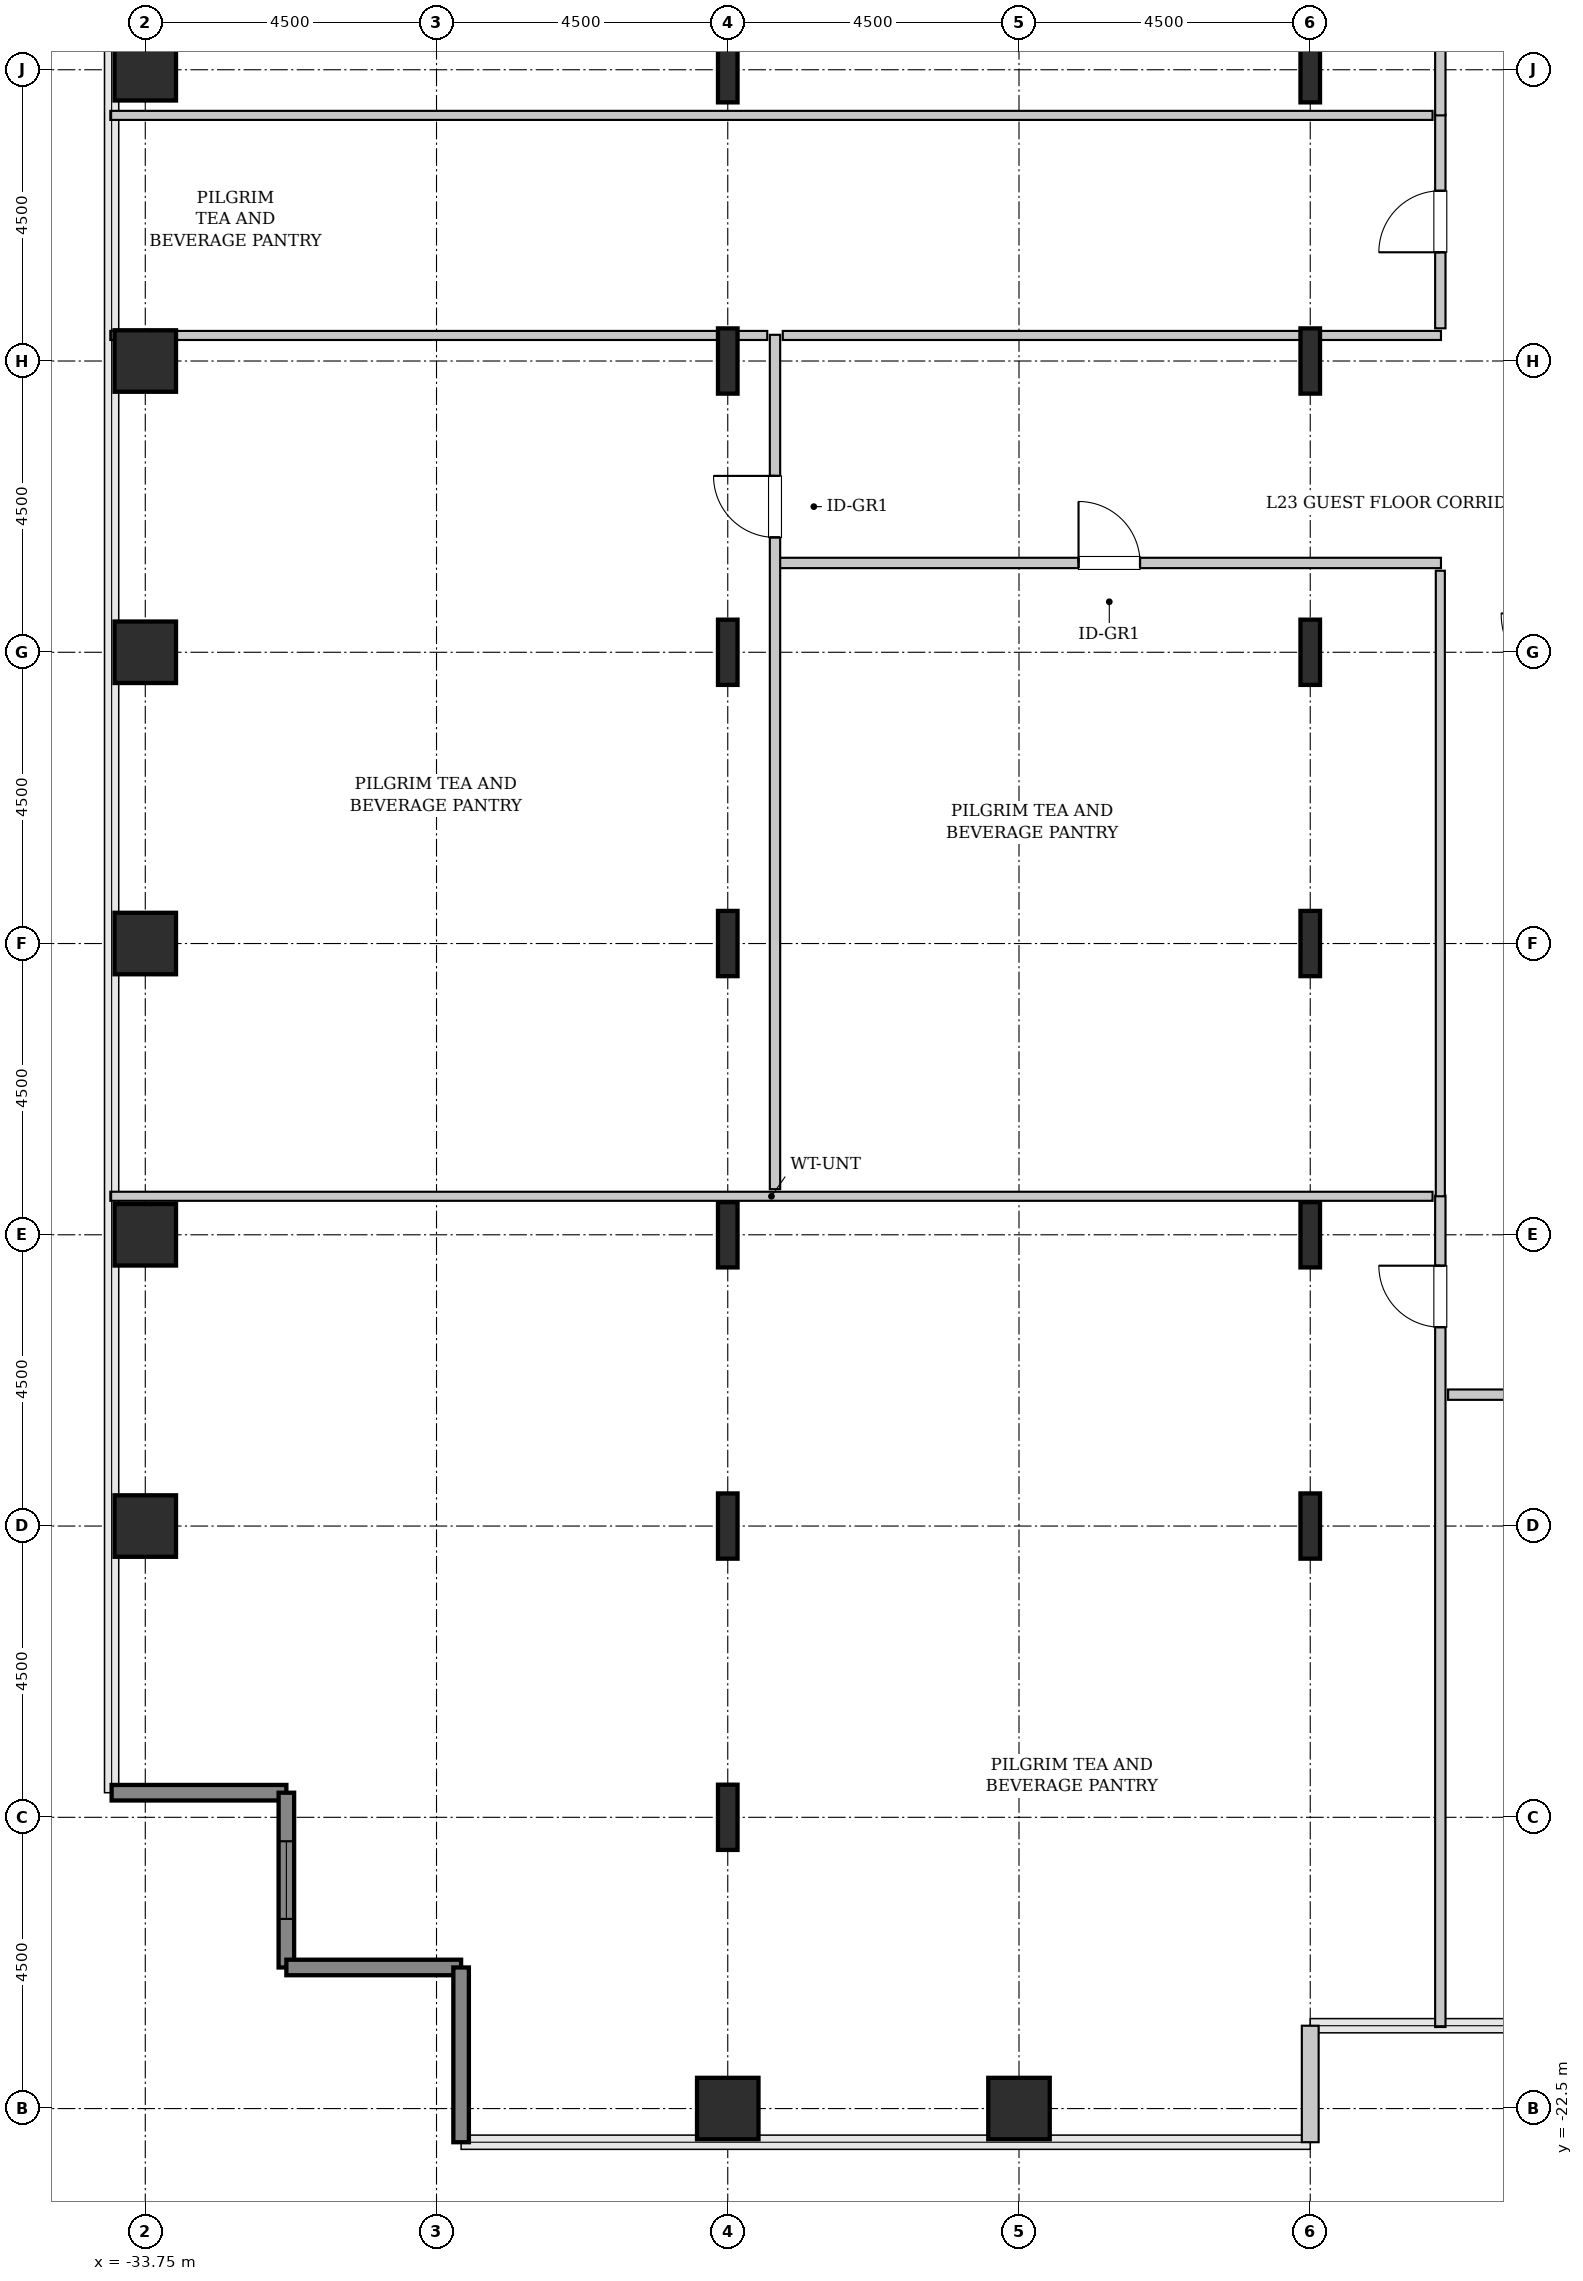
"""IFC4 building model, lengths in metres.
Left out: names, types, materials, properties, quantities, classifications, styles, units other than length and angle.
Written with IfcOpenShell. Run it as: python <this file> out.ifc"""

import sys

from ifc_helpers import new_model, si_unit, direction, frame, frame_2d, origin, origin_2d, place, context, subcontext, project, spatial, rectangle, hollow_rectangle, i_section, extrude, source, transform, mapped, element, fill, save


model = new_model("IFC4")
c1 = context("Model", 3, precision=1e-05, world=origin(), true_north=direction((0.0, 1.0)))
c2 = subcontext(c1, "Body", "Model", "MODEL_VIEW")
j1 = project(units=[si_unit("LENGTHUNIT", "METRE"), si_unit("PLANEANGLEUNIT", "RADIAN")], contexts=[c1])
p1 = place(None, origin())
s1 = spatial("IfcSite", under=j1, at=p1, CompositionType="ELEMENT")
p2 = place(p1, origin())
s2 = spatial("IfcBuilding", under=s1, at=p2, CompositionType="ELEMENT")
p3 = place(p2, frame((0.0, 0.0, 98.4)))
s3 = spatial("IfcBuildingStorey", under=s2, at=p3, CompositionType="ELEMENT", Elevation=98.4)
m1 = source(origin(), c2, "Body", "SweptSolid", [
    extrude(hollow_rectangle(XDim=0.95, YDim=0.95, WallThickness=0.045, InnerFilletRadius=0.045, OuterFilletRadius=0.09, at=origin_2d()), origin(), (0.0, 0.0, 1.0), 3.8),
])
for number, where, z_axis, x_axis in (
    (1, (-33.75, -13.5, 0.0), (0.0, 0.0, 1.0), (1.0, 0.0, 0.0)),
    (2, (-33.75, -9.0, 0.0), (0.0, 0.0, 1.0), (1.0, 0.0, 0.0)),
    (3, (-33.75, -4.5, 0.0), (0.0, 0.0, 1.0), (1.0, 0.0, 0.0)),
    (4, (-33.75, 0.0, 0.0), (0.0, 0.0, 1.0), (1.0, 0.0, 0.0)),
    (5, (-33.75, 4.5, 0.0), (0.0, 0.0, 1.0), (1.0, 0.0, 0.0)),
    (6, (-33.75, 9.0, 0.0), (0.0, 0.0, 1.0), (1.0, 0.0, 0.0)),
    (7, (-24.75, -22.5, 0.0), (0.0, 0.0, 1.0), (1.0, 0.0, 0.0)),
):
    element("IfcColumn", number, at=place(p3, frame(where, z_axis=z_axis, x_axis=x_axis)), inside=s3, PredefinedType="COLUMN", context=c2, shape_type="MappedRepresentation", body=[
        mapped(m1, transform((0.0, 0.0, 0.0), x_axis=(1.0, 0.0, 0.0), y_axis=(0.0, 1.0, 0.0), z_axis=(0.0, 0.0, 1.0), scale=1.0)),
    ])
m2 = source(origin(), c2, "Body", "SweptSolid", [
    extrude(i_section(OverallWidth=0.302, OverallDepth=1.008, WebThickness=0.021, FlangeThickness=0.04, FilletRadius=0.03, at=origin_2d()), origin(), (0.0, 0.0, 1.0), 3.8),
])
for number, where, z_axis, x_axis in (
    (8, (-24.75, -18.0, 0.0), (0.0, 0.0, 1.0), (1.0, 0.0, 0.0)),
    (9, (-24.75, -13.5, 0.0), (0.0, 0.0, 1.0), (1.0, 0.0, 0.0)),
    (10, (-24.75, -9.0, 0.0), (0.0, 0.0, 1.0), (1.0, 0.0, 0.0)),
    (11, (-24.75, -4.5, 0.0), (0.0, 0.0, 1.0), (1.0, 0.0, 0.0)),
    (12, (-24.75, 0.0, 0.0), (0.0, 0.0, 1.0), (1.0, 0.0, 0.0)),
    (13, (-24.75, 4.5, 0.0), (0.0, 0.0, 1.0), (1.0, 0.0, 0.0)),
    (14, (-24.75, 9.0, 0.0), (0.0, 0.0, 1.0), (1.0, 0.0, 0.0)),
):
    element("IfcColumn", number, at=place(p3, frame(where, z_axis=z_axis, x_axis=x_axis)), inside=s3, PredefinedType="COLUMN", context=c2, shape_type="MappedRepresentation", body=[
        mapped(m2, transform((0.0, 0.0, 0.0), x_axis=(1.0, 0.0, 0.0), y_axis=(0.0, 1.0, 0.0), z_axis=(0.0, 0.0, 1.0), scale=1.0)),
    ])
p4 = place(p3, frame((-20.25, -22.5, 0.0), z_axis=(0.0, 0.0, 1.0), x_axis=(1.0, 0.0, 0.0)))
e15 = element("IfcColumn", 15, at=p4, inside=s3, PredefinedType="COLUMN", context=c2, shape_type="MappedRepresentation", body=[
    mapped(m1, transform((0.0, 0.0, 0.0), x_axis=(1.0, 0.0, 0.0), y_axis=(0.0, 1.0, 0.0), z_axis=(0.0, 0.0, 1.0), scale=1.0)),
])
for number, where, z_axis, x_axis in (
    (16, (-15.75, -13.5, 0.0), (0.0, 0.0, 1.0), (1.0, 0.0, 0.0)),
    (17, (-15.75, -9.0, 0.0), (0.0, 0.0, 1.0), (1.0, 0.0, 0.0)),
    (18, (-15.75, -4.5, 0.0), (0.0, 0.0, 1.0), (1.0, 0.0, 0.0)),
    (19, (-15.75, 0.0, 0.0), (0.0, 0.0, 1.0), (1.0, 0.0, 0.0)),
    (20, (-15.75, 4.5, 0.0), (0.0, 0.0, 1.0), (1.0, 0.0, 0.0)),
    (21, (-15.75, 9.0, 0.0), (0.0, 0.0, 1.0), (1.0, 0.0, 0.0)),
):
    element("IfcColumn", number, at=place(p3, frame(where, z_axis=z_axis, x_axis=x_axis)), inside=s3, PredefinedType="COLUMN", context=c2, shape_type="MappedRepresentation", body=[
        mapped(m2, transform((0.0, 0.0, 0.0), x_axis=(1.0, 0.0, 0.0), y_axis=(0.0, 1.0, 0.0), z_axis=(0.0, 0.0, 1.0), scale=1.0)),
    ])
m3 = source(origin(), c2, "Body", "SweptSolid", [
    extrude(rectangle(XDim=2.7, YDim=0.24, at=frame_2d((1.35, 0.0))), origin(), (0.0, 0.0, 1.0), 3.55),
])
p5 = place(p3, frame((-34.27, -17.62, 0.0), z_axis=(0.0, 0.0, 1.0), x_axis=(1.0, 0.0, 0.0)))
e22 = element("IfcWall", 22, at=p5, inside=s3, PredefinedType="SHEAR", context=c2, shape_type="MappedRepresentation", body=[
    mapped(m3, transform((0.0, 0.0, 0.0), x_axis=(1.0, 0.0, 0.0), y_axis=(0.0, 1.0, 0.0), z_axis=(0.0, 0.0, 1.0), scale=1.0)),
])
p6 = place(p3, frame((-31.57, -17.62, 0.0), z_axis=(0.0, 0.0, 1.0), x_axis=(0.0, -1.0, 0.0)))
e23 = element("IfcWall", 23, at=p6, inside=s3, PredefinedType="SHEAR", context=c2, shape_type="MappedRepresentation", body=[
    mapped(m3, transform((0.0, 0.0, 0.0), x_axis=(1.0, 0.0, 0.0), y_axis=(0.0, 1.0, 0.0), z_axis=(0.0, 0.0, 1.0), scale=1.0)),
])
p7 = place(p6, frame((0.75, 0.0, 0.85)))
e24 = element("IfcOpeningElement", 24, at=p7, cuts=e23, PredefinedType="OPENING", context=c2, shape_type="SweptSolid", body=[
    extrude(rectangle(XDim=1.2, YDim=1.8, at=frame_2d((0.6, 0.9))), frame((0.0, 0.13, 0.0), z_axis=(0.0, -1.0, 0.0), x_axis=(1.0, 0.0, 0.0)), (0.0, 0.0, 1.0), 0.26),
])
for number, where, z_axis, x_axis in (
    (25, (-31.57, -20.32, 0.0), (0.0, 0.0, 1.0), (1.0, 0.0, 0.0)),
    (26, (-28.87, -20.32, 0.0), (0.0, 0.0, 1.0), (0.0, -1.0, 0.0)),
):
    element("IfcWall", number, at=place(p3, frame(where, z_axis=z_axis, x_axis=x_axis)), inside=s3, PredefinedType="SHEAR", context=c2, shape_type="MappedRepresentation", body=[
        mapped(m3, transform((0.0, 0.0, 0.0), x_axis=(1.0, 0.0, 0.0), y_axis=(0.0, 1.0, 0.0), z_axis=(0.0, 0.0, 1.0), scale=1.0)),
    ])
m4 = source(origin(), c2, "Body", "SweptSolid", [
    extrude(rectangle(XDim=1.8, YDim=0.26, at=frame_2d((0.9, 0.0))), origin(), (0.0, 0.0, 1.0), 3.55),
])
p8 = place(p3, frame((-15.75, -23.02, 0.0), z_axis=(0.0, 0.0, 1.0), x_axis=(0.0, 1.0, 0.0)))
e27 = element("IfcWall", 27, at=p8, inside=s3, PredefinedType="SOLIDWALL", context=c2, shape_type="MappedRepresentation", body=[
    mapped(m4, transform((0.0, 0.0, 0.0), x_axis=(1.0, 0.0, 0.0), y_axis=(0.0, 1.0, 0.0), z_axis=(0.0, 0.0, 1.0), scale=1.0)),
])
m5 = source(origin(), c2, "Body", "SweptSolid", [
    extrude(rectangle(XDim=12.845, YDim=0.16, at=frame_2d((6.422, 0.0))), origin(), (0.0, 0.0, 1.0), 3.535),
])
p9 = place(p3, frame((-13.74, -21.24, 0.0), z_axis=(0.0, 0.0, 1.0), x_axis=(0.0, 1.0, 0.0)))
e28 = element("IfcWall", 28, at=p9, inside=s3, PredefinedType="PARTITIONING", context=c2, shape_type="MappedRepresentation", body=[
    mapped(m5, transform((0.0, 0.0, 0.0), x_axis=(1.0, 0.0, 0.0), y_axis=(0.0, 1.0, 0.0), z_axis=(0.0, 0.0, 1.0), scale=1.0)),
])
p10 = place(p9, frame((10.812, 0.0, 0.0)))
e29 = element("IfcOpeningElement", 29, at=p10, cuts=e28, PredefinedType="OPENING", context=c2, shape_type="SweptSolid", body=[
    extrude(rectangle(XDim=0.95, YDim=2.1, at=frame_2d((0.475, 1.05))), frame((0.0, 0.09, 0.0), z_axis=(0.0, -1.0, 0.0), x_axis=(1.0, 0.0, 0.0)), (0.0, 0.0, 1.0), 0.18),
])
m6 = source(origin(), c2, "Body", "SweptSolid", [
    extrude(rectangle(XDim=20.43, YDim=0.14, at=frame_2d((10.215, 0.0))), origin(), (0.0, 0.0, 1.0), 3.535),
])
p11 = place(p3, frame((-34.29, -8.405, 0.0), z_axis=(0.0, 0.0, 1.0), x_axis=(1.0, 0.0, 0.0)))
e30 = element("IfcWall", 30, at=p11, inside=s3, PredefinedType="PARTITIONING", context=c2, shape_type="MappedRepresentation", body=[
    mapped(m6, transform((0.0, 0.0, 0.0), x_axis=(1.0, 0.0, 0.0), y_axis=(0.0, 1.0, 0.0), z_axis=(0.0, 0.0, 1.0), scale=1.0)),
])
m7 = source(origin(), c2, "Body", "SweptSolid", [
    extrude(rectangle(XDim=10.25, YDim=0.16, at=frame_2d((5.125, 0.0))), origin(), (0.0, 0.0, 1.0), 3.535),
])
p12 = place(p3, frame((-23.98, 1.38, 0.0), z_axis=(0.0, 0.0, 1.0), x_axis=(1.0, 0.0, 0.0)))
e31 = element("IfcWall", 31, at=p12, inside=s3, PredefinedType="PARTITIONING", context=c2, shape_type="MappedRepresentation", body=[
    mapped(m7, transform((0.0, 0.0, 0.0), x_axis=(1.0, 0.0, 0.0), y_axis=(0.0, 1.0, 0.0), z_axis=(0.0, 0.0, 1.0), scale=1.0)),
])
p13 = place(p12, frame((4.65, 0.0, 0.0)))
e32 = element("IfcOpeningElement", 32, at=p13, cuts=e31, PredefinedType="OPENING", context=c2, shape_type="SweptSolid", body=[
    extrude(rectangle(XDim=0.95, YDim=2.1, at=frame_2d((0.475, 1.05))), frame((0.0, 0.09, 0.0), z_axis=(0.0, -1.0, 0.0), x_axis=(1.0, 0.0, 0.0)), (0.0, 0.0, 1.0), 0.18),
])
m8 = source(origin(), c2, "Body", "SweptSolid", [
    extrude(rectangle(XDim=9.665, YDim=0.14, at=frame_2d((4.833, 0.0))), origin(), (0.0, 0.0, 1.0), 3.535),
])
p14 = place(p3, frame((-13.74, -8.405, 0.0), z_axis=(0.0, 0.0, 1.0), x_axis=(0.0, 1.0, 0.0)))
e33 = element("IfcWall", 33, at=p14, inside=s3, PredefinedType="PARTITIONING", context=c2, shape_type="MappedRepresentation", body=[
    mapped(m8, transform((0.0, 0.0, 0.0), x_axis=(1.0, 0.0, 0.0), y_axis=(0.0, 1.0, 0.0), z_axis=(0.0, 0.0, 1.0), scale=1.0)),
])
m9 = source(origin(), c2, "Body", "SweptSolid", [
    extrude(rectangle(XDim=13.2, YDim=0.16, at=frame_2d((6.6, 0.0))), origin(), (0.0, 0.0, 1.0), 3.535),
])
p15 = place(p3, frame((-24.02, -8.295, 0.0), z_axis=(0.0, 0.0, 1.0), x_axis=(0.0, 1.0, 0.0)))
e34 = element("IfcWall", 34, at=p15, inside=s3, PredefinedType="PARTITIONING", context=c2, shape_type="MappedRepresentation", body=[
    mapped(m9, transform((0.0, 0.0, 0.0), x_axis=(1.0, 0.0, 0.0), y_axis=(0.0, 1.0, 0.0), z_axis=(0.0, 0.0, 1.0), scale=1.0)),
])
p16 = place(p15, frame((10.07, 0.0, 0.0)))
e35 = element("IfcOpeningElement", 35, at=p16, cuts=e34, PredefinedType="OPENING", context=c2, shape_type="SweptSolid", body=[
    extrude(rectangle(XDim=0.95, YDim=2.1, at=frame_2d((0.475, 1.05))), frame((0.0, 0.09, 0.0), z_axis=(0.0, -1.0, 0.0), x_axis=(1.0, 0.0, 0.0)), (0.0, 0.0, 1.0), 0.18),
])
m10 = source(origin(), c2, "Body", "SweptSolid", [
    extrude(rectangle(XDim=10.15, YDim=0.14, at=frame_2d((5.075, 0.0))), origin(), (0.0, 0.0, 1.0), 2.825),
])
p17 = place(p3, frame((-34.29, 4.895, 0.0), z_axis=(0.0, 0.0, 1.0), x_axis=(1.0, 0.0, 0.0)))
e36 = element("IfcWall", 36, at=p17, inside=s3, PredefinedType="PARTITIONING", context=c2, shape_type="MappedRepresentation", body=[
    mapped(m10, transform((0.0, 0.0, 0.0), x_axis=(1.0, 0.0, 0.0), y_axis=(0.0, 1.0, 0.0), z_axis=(0.0, 0.0, 1.0), scale=1.0)),
])
m11 = source(origin(), c2, "Body", "SweptSolid", [
    extrude(rectangle(XDim=10.17, YDim=0.14, at=frame_2d((5.085, 0.0))), origin(), (0.0, 0.0, 1.0), 2.825),
])
p18 = place(p3, frame((-23.9, 4.895, 0.0), z_axis=(0.0, 0.0, 1.0), x_axis=(1.0, 0.0, 0.0)))
e37 = element("IfcWall", 37, at=p18, inside=s3, PredefinedType="PARTITIONING", context=c2, shape_type="MappedRepresentation", body=[
    mapped(m11, transform((0.0, 0.0, 0.0), x_axis=(1.0, 0.0, 0.0), y_axis=(0.0, 1.0, 0.0), z_axis=(0.0, 0.0, 1.0), scale=1.0)),
])
m12 = source(origin(), c2, "Body", "SweptSolid", [
    extrude(rectangle(XDim=3.3, YDim=0.16, at=frame_2d((1.65, 0.0))), origin(), (0.0, 0.0, 1.0), 3.535),
])
p19 = place(p3, frame((-13.74, 5.005, 0.0), z_axis=(0.0, 0.0, 1.0), x_axis=(0.0, 1.0, 0.0)))
e38 = element("IfcWall", 38, at=p19, inside=s3, PredefinedType="PARTITIONING", context=c2, shape_type="MappedRepresentation", body=[
    mapped(m12, transform((0.0, 0.0, 0.0), x_axis=(1.0, 0.0, 0.0), y_axis=(0.0, 1.0, 0.0), z_axis=(0.0, 0.0, 1.0), scale=1.0)),
])
p20 = place(p19, frame((1.175, 0.0, 0.0)))
e39 = element("IfcOpeningElement", 39, at=p20, cuts=e38, PredefinedType="OPENING", context=c2, shape_type="SweptSolid", body=[
    extrude(rectangle(XDim=0.95, YDim=2.1, at=frame_2d((0.475, 1.05))), frame((0.0, 0.09, 0.0), z_axis=(0.0, -1.0, 0.0), x_axis=(1.0, 0.0, 0.0)), (0.0, 0.0, 1.0), 0.18),
])
p21 = place(p3, frame((-34.29, 8.295, 0.0), z_axis=(0.0, 0.0, 1.0), x_axis=(1.0, 0.0, 0.0)))
e40 = element("IfcWall", 40, at=p21, inside=s3, PredefinedType="PARTITIONING", context=c2, shape_type="MappedRepresentation", body=[
    mapped(m6, transform((0.0, 0.0, 0.0), x_axis=(1.0, 0.0, 0.0), y_axis=(0.0, 1.0, 0.0), z_axis=(0.0, 0.0, 1.0), scale=1.0)),
])
m13 = source(origin(), c2, "Body", "SweptSolid", [
    extrude(rectangle(XDim=12.945, YDim=0.16, at=frame_2d((6.473, 0.0))), origin(), (0.0, 0.0, 1.0), 3.535),
])
p22 = place(p3, frame((-13.74, 8.295, 0.0), z_axis=(0.0, 0.0, 1.0), x_axis=(0.0, 1.0, 0.0)))
e41 = element("IfcWall", 41, at=p22, inside=s3, PredefinedType="PARTITIONING", context=c2, shape_type="MappedRepresentation", body=[
    mapped(m13, transform((0.0, 0.0, 0.0), x_axis=(1.0, 0.0, 0.0), y_axis=(0.0, 1.0, 0.0), z_axis=(0.0, 0.0, 1.0), scale=1.0)),
])
p23 = place(p22, frame((1.133, 0.0, 0.0)))
e42 = element("IfcOpeningElement", 42, at=p23, cuts=e41, PredefinedType="OPENING", context=c2, shape_type="SweptSolid", body=[
    extrude(rectangle(XDim=0.95, YDim=2.1, at=frame_2d((0.475, 1.05))), frame((0.0, 0.09, 0.0), z_axis=(0.0, -1.0, 0.0), x_axis=(1.0, 0.0, 0.0)), (0.0, 0.0, 1.0), 0.18),
])
m14 = source(origin(), c2, "Body", "SweptSolid", [
    extrude(rectangle(XDim=5.425, YDim=0.16, at=frame_2d((2.712, 0.0))), origin(), (0.0, 0.0, 1.0), 3.535),
])
p24 = place(p3, frame((-13.62, -11.47, 0.0), z_axis=(0.0, 0.0, 1.0), x_axis=(1.0, 0.0, 0.0)))
e43 = element("IfcWall", 43, at=p24, inside=s3, PredefinedType="PARTITIONING", context=c2, shape_type="MappedRepresentation", body=[
    mapped(m14, transform((0.0, 0.0, 0.0), x_axis=(1.0, 0.0, 0.0), y_axis=(0.0, 1.0, 0.0), z_axis=(0.0, 0.0, 1.0), scale=1.0)),
])
p25 = place(p24, frame((2.238, 0.0, 0.0)))
e44 = element("IfcOpeningElement", 44, at=p25, cuts=e43, PredefinedType="OPENING", context=c2, shape_type="SweptSolid", body=[
    extrude(rectangle(XDim=0.95, YDim=2.1, at=frame_2d((0.475, 1.05))), frame((0.0, 0.09, 0.0), z_axis=(0.0, -1.0, 0.0), x_axis=(1.0, 0.0, 0.0)), (0.0, 0.0, 1.0), 0.18),
])
m15 = source(origin(), c2, "Body", "SweptSolid", [
    extrude(rectangle(XDim=1.2, YDim=1.8, at=frame_2d((0.6, 0.9))), frame((0.0, 0.03, 0.0), z_axis=(0.0, -1.0, 0.0), x_axis=(1.0, 0.0, 0.0)), (0.0, 0.0, 1.0), 0.06),
])
p26 = place(p7, origin())
e45 = element("IfcWindow", 45, at=p26, inside=s3, PartitioningType="SINGLE_PANEL", PredefinedType="WINDOW", context=c2, shape_type="MappedRepresentation", body=[
    mapped(m15, transform((0.0, 0.0, 0.0), x_axis=(1.0, 0.0, 0.0), y_axis=(0.0, 1.0, 0.0), z_axis=(0.0, 0.0, 1.0), scale=1.0)),
])
fill(e24, e45)
m16 = source(origin(), c2, "Body", "SweptSolid", [
    extrude(rectangle(XDim=0.95, YDim=2.1, at=frame_2d((0.475, 1.05))), frame((0.0, 0.025, 0.0), z_axis=(0.0, -1.0, 0.0), x_axis=(1.0, 0.0, 0.0)), (0.0, 0.0, 1.0), 0.05),
])
p27 = place(p10, origin())
e46 = element("IfcDoor", 46, at=p27, inside=s3, OperationType="SINGLE_SWING_RIGHT", PredefinedType="DOOR", context=c2, shape_type="MappedRepresentation", body=[
    mapped(m16, transform((0.0, 0.0, 0.0), x_axis=(1.0, 0.0, 0.0), y_axis=(0.0, 1.0, 0.0), z_axis=(0.0, 0.0, 1.0), scale=1.0)),
])
fill(e29, e46)
p28 = place(p13, origin())
e47 = element("IfcDoor", 47, at=p28, inside=s3, OperationType="SINGLE_SWING_LEFT", PredefinedType="DOOR", context=c2, shape_type="MappedRepresentation", body=[
    mapped(m16, transform((0.0, 0.0, 0.0), x_axis=(1.0, 0.0, 0.0), y_axis=(0.0, 1.0, 0.0), z_axis=(0.0, 0.0, 1.0), scale=1.0)),
])
fill(e32, e47)
p29 = place(p16, origin())
e48 = element("IfcDoor", 48, at=p29, inside=s3, OperationType="SINGLE_SWING_RIGHT", PredefinedType="DOOR", context=c2, shape_type="MappedRepresentation", body=[
    mapped(m16, transform((0.0, 0.0, 0.0), x_axis=(1.0, 0.0, 0.0), y_axis=(0.0, 1.0, 0.0), z_axis=(0.0, 0.0, 1.0), scale=1.0)),
])
fill(e35, e48)
p30 = place(p20, origin())
e49 = element("IfcDoor", 49, at=p30, inside=s3, OperationType="SINGLE_SWING_LEFT", PredefinedType="DOOR", context=c2, shape_type="MappedRepresentation", body=[
    mapped(m16, transform((0.0, 0.0, 0.0), x_axis=(1.0, 0.0, 0.0), y_axis=(0.0, 1.0, 0.0), z_axis=(0.0, 0.0, 1.0), scale=1.0)),
])
fill(e39, e49)
save(model, sys.argv[1])
